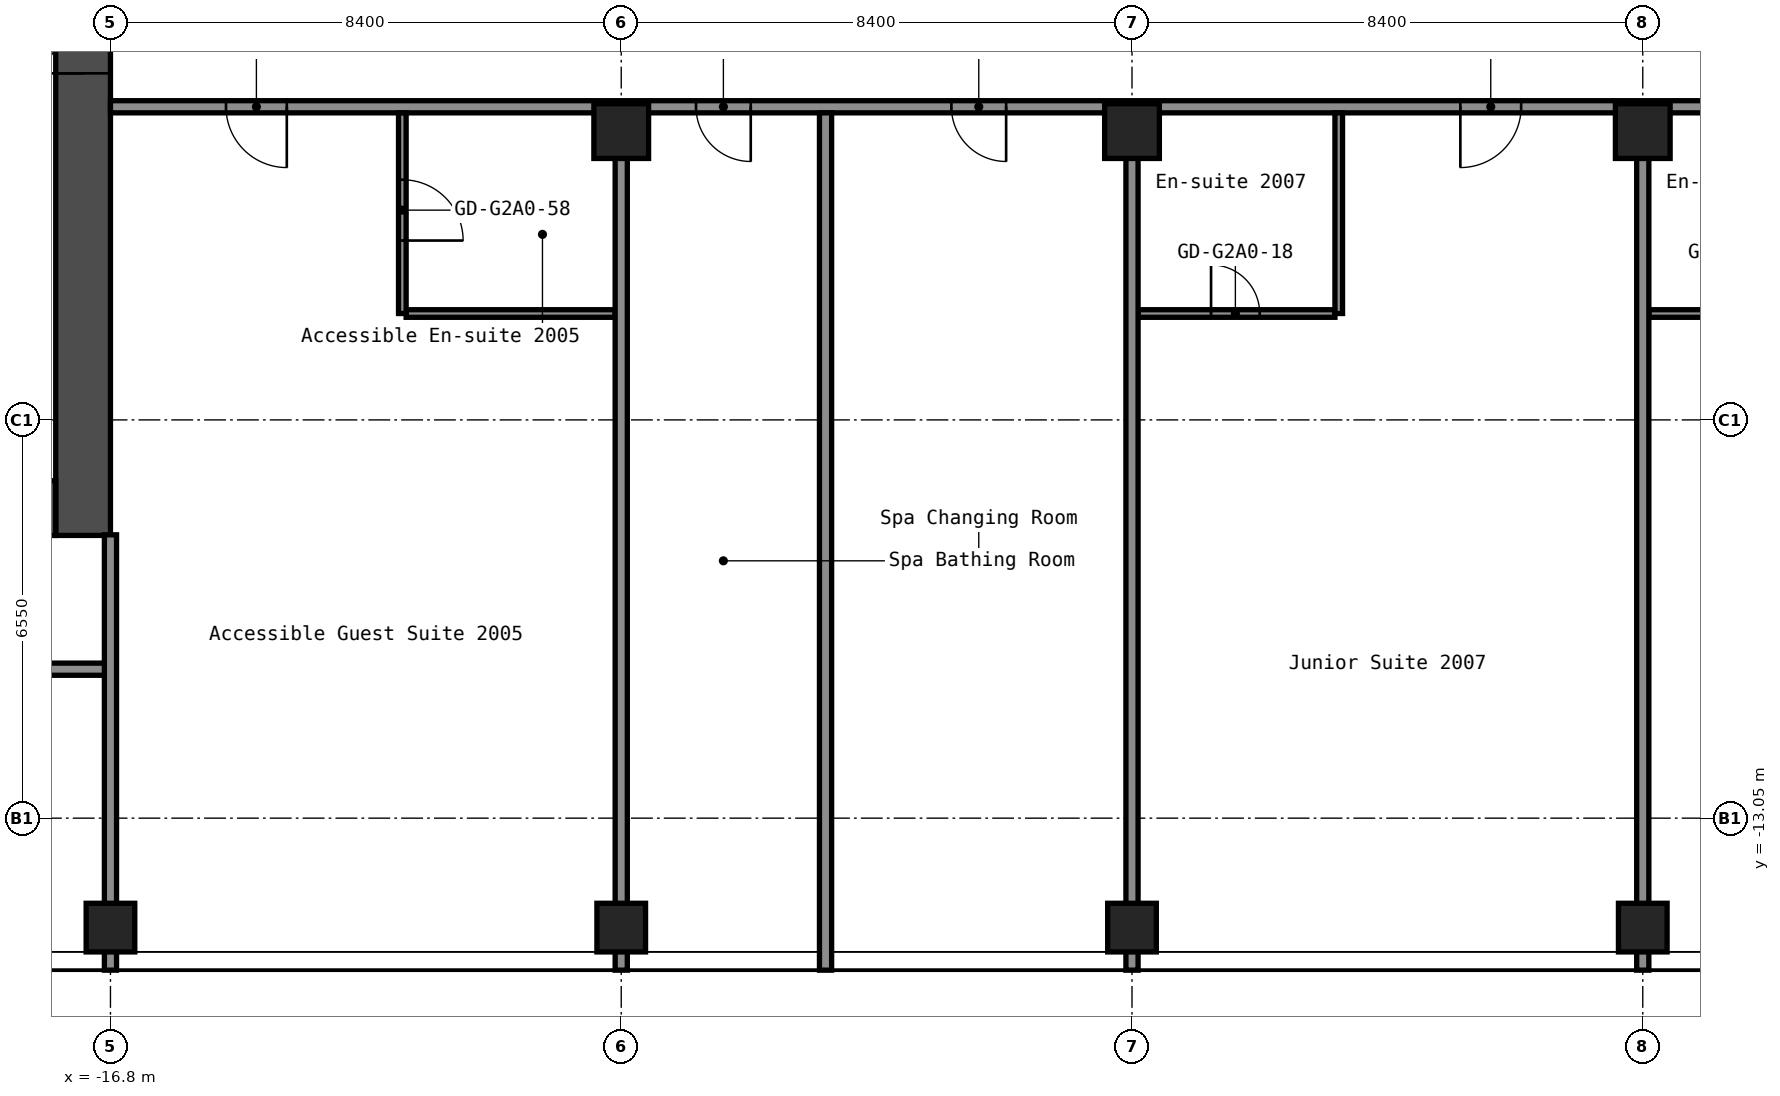
"""IFC4 building model, lengths in metres.
Left out: names, types, materials, properties, quantities, classifications, styles, units other than length and angle.
Written with IfcOpenShell. Run it as: python <this file> out.ifc"""

import sys

from ifc_helpers import new_model, si_unit, direction, frame, frame_2d, origin, origin_2d, place, context, subcontext, project, spatial, rectangle, hollow_rectangle, extrude, element, fill, save


model = new_model("IFC4")
c1 = context("Model", 3, precision=1e-05, world=origin(), true_north=direction((0.0, 1.0)))
c2 = subcontext(c1, "Body", "Model", "MODEL_VIEW")
j1 = project(units=[si_unit("LENGTHUNIT", "METRE"), si_unit("PLANEANGLEUNIT", "RADIAN")], contexts=[c1])
p1 = place(None, origin())
s1 = spatial("IfcSite", under=j1, at=p1, CompositionType="ELEMENT")
p2 = place(p1, origin())
s2 = spatial("IfcBuilding", under=s1, at=p2, CompositionType="ELEMENT")
p3 = place(p2, frame((0.0, 0.0, 75.4)))
s3 = spatial("IfcBuildingStorey", under=s2, at=p3, CompositionType="ELEMENT", Elevation=75.4)
for number, where, z_axis, x_axis in (
    (1, (-16.8, -14.85, 0.0), (0.0, 0.0, 1.0), (1.0, 0.0, 0.0)),
    (2, (-8.4, -14.85, 0.0), (0.0, 0.0, 1.0), (1.0, 0.0, 0.0)),
):
    element("IfcColumn", number, at=place(p3, frame(where, z_axis=z_axis, x_axis=x_axis)), inside=s3, PredefinedType="COLUMN", context=c2, shape_type="SweptSolid", body=[
        extrude(hollow_rectangle(XDim=0.8, YDim=0.8, WallThickness=0.032, at=origin_2d()), origin(), (0.0, 0.0, 1.0), 2.8),
    ])
p4 = place(p3, frame((-8.4, -1.75, 0.0), z_axis=(0.0, 0.0, 1.0), x_axis=(1.0, 0.0, 0.0)))
e3 = element("IfcColumn", 3, at=p4, inside=s3, PredefinedType="COLUMN", context=c2, shape_type="SweptSolid", body=[
    extrude(hollow_rectangle(XDim=0.9, YDim=0.9, WallThickness=0.036, at=origin_2d()), origin(), (0.0, 0.0, 1.0), 2.8),
])
p5 = place(p3, frame((0.0, -14.85, 0.0), z_axis=(0.0, 0.0, 1.0), x_axis=(1.0, 0.0, 0.0)))
e4 = element("IfcColumn", 4, at=p5, inside=s3, PredefinedType="COLUMN", context=c2, shape_type="SweptSolid", body=[
    extrude(hollow_rectangle(XDim=0.8, YDim=0.8, WallThickness=0.032, at=origin_2d()), origin(), (0.0, 0.0, 1.0), 2.8),
])
p6 = place(p3, frame((0.0, -1.75, 0.0), z_axis=(0.0, 0.0, 1.0), x_axis=(1.0, 0.0, 0.0)))
e5 = element("IfcColumn", 5, at=p6, inside=s3, PredefinedType="COLUMN", context=c2, shape_type="SweptSolid", body=[
    extrude(hollow_rectangle(XDim=0.9, YDim=0.9, WallThickness=0.036, at=origin_2d()), origin(), (0.0, 0.0, 1.0), 2.8),
])
p7 = place(p3, frame((8.4, -14.85, 0.0), z_axis=(0.0, 0.0, 1.0), x_axis=(1.0, 0.0, 0.0)))
e6 = element("IfcColumn", 6, at=p7, inside=s3, PredefinedType="COLUMN", context=c2, shape_type="SweptSolid", body=[
    extrude(hollow_rectangle(XDim=0.8, YDim=0.8, WallThickness=0.032, at=origin_2d()), origin(), (0.0, 0.0, 1.0), 2.8),
])
p8 = place(p3, frame((8.4, -1.75, 0.0), z_axis=(0.0, 0.0, 1.0), x_axis=(1.0, 0.0, 0.0)))
e7 = element("IfcColumn", 7, at=p8, inside=s3, PredefinedType="COLUMN", context=c2, shape_type="SweptSolid", body=[
    extrude(hollow_rectangle(XDim=0.9, YDim=0.9, WallThickness=0.036, at=origin_2d()), origin(), (0.0, 0.0, 1.0), 2.8),
])
p9 = place(p3, frame((-17.25, -8.4, 0.0), z_axis=(0.0, 0.0, 1.0), x_axis=(0.0, 1.0, 0.0)))
e8 = element("IfcWall", 8, at=p9, inside=s3, PredefinedType="SHEAR", context=c2, shape_type="SweptSolid", body=[
    extrude(rectangle(XDim=16.8, YDim=0.9, at=frame_2d((8.4, 0.0))), origin(), (0.0, 0.0, 1.0), 2.8),
])
p10 = place(p9, frame((7.6, 0.0, 0.0)))
e9 = element("IfcOpeningElement", 9, at=p10, cuts=e8, PredefinedType="OPENING", context=c2, shape_type="SweptSolid", body=[
    extrude(rectangle(XDim=1.2, YDim=2.1, at=frame_2d((0.6, 1.05))), frame((0.0, 0.46, 0.0), z_axis=(0.0, -1.0, 0.0), x_axis=(1.0, 0.0, 0.0)), (0.0, 0.0, 1.0), 0.92),
])
p11 = place(p3, frame((-32.7, -7.95, 0.0), z_axis=(0.0, 0.0, 1.0), x_axis=(1.0, 0.0, 0.0)))
e10 = element("IfcWall", 10, at=p11, inside=s3, PredefinedType="SHEAR", context=c2, shape_type="SweptSolid", body=[
    extrude(rectangle(XDim=15.0, YDim=0.9, at=frame_2d((7.5, 0.0))), origin(), (0.0, 0.0, 1.0), 2.8),
])
p12 = place(p11, frame((11.45, 0.0, 0.0)))
e11 = element("IfcOpeningElement", 11, at=p12, cuts=e10, PredefinedType="OPENING", context=c2, shape_type="SweptSolid", body=[
    extrude(rectangle(XDim=1.0, YDim=2.1, at=frame_2d((0.5, 1.05))), frame((0.0, 0.46, 0.0), z_axis=(0.0, -1.0, 0.0), x_axis=(1.0, 0.0, 0.0)), (0.0, 0.0, 1.0), 0.92),
])
p13 = place(p3, frame((-46.5, -10.6, 0.0), z_axis=(0.0, 0.0, 1.0), x_axis=(1.0, 0.0, 0.0)))
e12 = element("IfcWall", 12, at=p13, inside=s3, PredefinedType="PARTITIONING", context=c2, shape_type="SweptSolid", body=[
    extrude(rectangle(XDim=29.7, YDim=0.2, at=frame_2d((14.85, 0.0))), origin(), (0.0, 0.0, 1.0), 2.8),
])
p14 = place(p13, frame((1.95, 0.0, 0.0)))
e13 = element("IfcOpeningElement", 13, at=p14, cuts=e12, PredefinedType="OPENING", context=c2, shape_type="SweptSolid", body=[
    extrude(rectangle(XDim=0.9, YDim=2.1, at=frame_2d((0.45, 1.05))), frame((0.0, 0.11, 0.0), z_axis=(0.0, -1.0, 0.0), x_axis=(1.0, 0.0, 0.0)), (0.0, 0.0, 1.0), 0.22),
])
p15 = place(p13, frame((8.2, 0.0, 0.0)))
e14 = element("IfcOpeningElement", 14, at=p15, cuts=e12, PredefinedType="OPENING", context=c2, shape_type="SweptSolid", body=[
    extrude(rectangle(XDim=1.0, YDim=2.1, at=frame_2d((0.5, 1.05))), frame((0.0, 0.11, 0.0), z_axis=(0.0, -1.0, 0.0), x_axis=(1.0, 0.0, 0.0)), (0.0, 0.0, 1.0), 0.22),
])
p16 = place(p13, frame((14.8, 0.0, 0.0)))
e15 = element("IfcOpeningElement", 15, at=p16, cuts=e12, PredefinedType="OPENING", context=c2, shape_type="SweptSolid", body=[
    extrude(rectangle(XDim=0.9, YDim=2.1, at=frame_2d((0.45, 1.05))), frame((0.0, 0.11, 0.0), z_axis=(0.0, -1.0, 0.0), x_axis=(1.0, 0.0, 0.0)), (0.0, 0.0, 1.0), 0.22),
])
p17 = place(p13, frame((19.0, 0.0, 0.0)))
e16 = element("IfcOpeningElement", 16, at=p17, cuts=e12, PredefinedType="OPENING", context=c2, shape_type="SweptSolid", body=[
    extrude(rectangle(XDim=0.9, YDim=2.1, at=frame_2d((0.45, 1.05))), frame((0.0, 0.11, 0.0), z_axis=(0.0, -1.0, 0.0), x_axis=(1.0, 0.0, 0.0)), (0.0, 0.0, 1.0), 0.22),
])
p18 = place(p13, frame((22.555, 0.0, 0.0)))
e17 = element("IfcOpeningElement", 17, at=p18, cuts=e12, PredefinedType="OPENING", context=c2, shape_type="SweptSolid", body=[
    extrude(rectangle(XDim=0.9, YDim=2.1, at=frame_2d((0.45, 1.05))), frame((0.0, 0.11, 0.0), z_axis=(0.0, -1.0, 0.0), x_axis=(1.0, 0.0, 0.0)), (0.0, 0.0, 1.0), 0.22),
])
p19 = place(p13, frame((26.755, 0.0, 0.0)))
e18 = element("IfcOpeningElement", 18, at=p19, cuts=e12, PredefinedType="OPENING", context=c2, shape_type="SweptSolid", body=[
    extrude(rectangle(XDim=0.9, YDim=2.1, at=frame_2d((0.45, 1.05))), frame((0.0, 0.11, 0.0), z_axis=(0.0, -1.0, 0.0), x_axis=(1.0, 0.0, 0.0)), (0.0, 0.0, 1.0), 0.22),
])
p20 = place(p3, frame((-11.938, -4.75, 0.0), z_axis=(0.0, 0.0, 1.0), x_axis=(1.0, 0.0, 0.0)))
e19 = element("IfcWall", 19, at=p20, inside=s3, PredefinedType="PARTITIONING", context=c2, shape_type="SweptSolid", body=[
    extrude(rectangle(XDim=3.438, YDim=0.125, at=frame_2d((1.719, 0.0))), origin(), (0.0, 0.0, 1.0), 2.8),
])
p21 = place(p3, frame((0.1, -4.75, 0.0), z_axis=(0.0, 0.0, 1.0), x_axis=(1.0, 0.0, 0.0)))
e20 = element("IfcWall", 20, at=p21, inside=s3, PredefinedType="PARTITIONING", context=c2, shape_type="SweptSolid", body=[
    extrude(rectangle(XDim=3.237, YDim=0.125, at=frame_2d((1.619, 0.0))), origin(), (0.0, 0.0, 1.0), 2.8),
])
p22 = place(p21, frame((1.2, 0.0, 0.0)))
e21 = element("IfcOpeningElement", 21, at=p22, cuts=e20, PredefinedType="OPENING", context=c2, shape_type="SweptSolid", body=[
    extrude(rectangle(XDim=0.8, YDim=2.1, at=frame_2d((0.4, 1.05))), frame((0.0, 0.073, 0.0), z_axis=(0.0, -1.0, 0.0), x_axis=(1.0, 0.0, 0.0)), (0.0, 0.0, 1.0), 0.145),
])
p23 = place(p3, frame((8.5, -4.75, 0.0), z_axis=(0.0, 0.0, 1.0), x_axis=(1.0, 0.0, 0.0)))
e22 = element("IfcWall", 22, at=p23, inside=s3, PredefinedType="PARTITIONING", context=c2, shape_type="SweptSolid", body=[
    extrude(rectangle(XDim=3.238, YDim=0.125, at=frame_2d((1.619, 0.0))), origin(), (0.0, 0.0, 1.0), 2.8),
])
p24 = place(p23, frame((1.2, 0.0, 0.0)))
e23 = element("IfcOpeningElement", 23, at=p24, cuts=e22, PredefinedType="OPENING", context=c2, shape_type="SweptSolid", body=[
    extrude(rectangle(XDim=0.8, YDim=2.1, at=frame_2d((0.4, 1.05))), frame((0.0, 0.073, 0.0), z_axis=(0.0, -1.0, 0.0), x_axis=(1.0, 0.0, 0.0)), (0.0, 0.0, 1.0), 0.145),
])
p25 = place(p3, frame((-16.8, -1.35, 0.0), z_axis=(0.0, 0.0, 1.0), x_axis=(1.0, 0.0, 0.0)))
e24 = element("IfcWall", 24, at=p25, inside=s3, PredefinedType="PARTITIONING", context=c2, shape_type="SweptSolid", body=[
    extrude(rectangle(XDim=33.6, YDim=0.2, at=frame_2d((16.8, 0.0))), origin(), (0.0, 0.0, 1.0), 2.8),
])
p26 = place(p25, frame((1.9, 0.0, 0.0)))
e25 = element("IfcOpeningElement", 25, at=p26, cuts=e24, PredefinedType="OPENING", context=c2, shape_type="SweptSolid", body=[
    extrude(rectangle(XDim=1.0, YDim=2.1, at=frame_2d((0.5, 1.05))), frame((0.0, 0.11, 0.0), z_axis=(0.0, -1.0, 0.0), x_axis=(1.0, 0.0, 0.0)), (0.0, 0.0, 1.0), 0.22),
])
p27 = place(p25, frame((9.63, 0.0, 0.0)))
e26 = element("IfcOpeningElement", 26, at=p27, cuts=e24, PredefinedType="OPENING", context=c2, shape_type="SweptSolid", body=[
    extrude(rectangle(XDim=0.9, YDim=2.1, at=frame_2d((0.45, 1.05))), frame((0.0, 0.11, 0.0), z_axis=(0.0, -1.0, 0.0), x_axis=(1.0, 0.0, 0.0)), (0.0, 0.0, 1.0), 0.22),
])
p28 = place(p25, frame((13.83, 0.0, 0.0)))
e27 = element("IfcOpeningElement", 27, at=p28, cuts=e24, PredefinedType="OPENING", context=c2, shape_type="SweptSolid", body=[
    extrude(rectangle(XDim=0.9, YDim=2.1, at=frame_2d((0.45, 1.05))), frame((0.0, 0.11, 0.0), z_axis=(0.0, -1.0, 0.0), x_axis=(1.0, 0.0, 0.0)), (0.0, 0.0, 1.0), 0.22),
])
p29 = place(p25, frame((22.2, 0.0, 0.0)))
e28 = element("IfcOpeningElement", 28, at=p29, cuts=e24, PredefinedType="OPENING", context=c2, shape_type="SweptSolid", body=[
    extrude(rectangle(XDim=1.0, YDim=2.1, at=frame_2d((0.5, 1.05))), frame((0.0, 0.11, 0.0), z_axis=(0.0, -1.0, 0.0), x_axis=(1.0, 0.0, 0.0)), (0.0, 0.0, 1.0), 0.22),
])
p30 = place(p25, frame((30.6, 0.0, 0.0)))
e29 = element("IfcOpeningElement", 29, at=p30, cuts=e24, PredefinedType="OPENING", context=c2, shape_type="SweptSolid", body=[
    extrude(rectangle(XDim=1.0, YDim=2.1, at=frame_2d((0.5, 1.05))), frame((0.0, 0.11, 0.0), z_axis=(0.0, -1.0, 0.0), x_axis=(1.0, 0.0, 0.0)), (0.0, 0.0, 1.0), 0.22),
])
p31 = place(p3, frame((-16.8, -15.55, 0.0), z_axis=(0.0, 0.0, 1.0), x_axis=(0.0, 1.0, 0.0)))
e30 = element("IfcWall", 30, at=p31, inside=s3, PredefinedType="PARTITIONING", context=c2, shape_type="SweptSolid", body=[
    extrude(rectangle(XDim=7.16, YDim=0.2, at=frame_2d((3.58, 0.0))), origin(), (0.0, 0.0, 1.0), 2.8),
])
p32 = place(p3, frame((-12.0, -4.75, 0.0), z_axis=(0.0, 0.0, 1.0), x_axis=(0.0, 1.0, 0.0)))
e31 = element("IfcWall", 31, at=p32, inside=s3, PredefinedType="PARTITIONING", context=c2, shape_type="SweptSolid", body=[
    extrude(rectangle(XDim=3.3, YDim=0.125, at=frame_2d((1.65, 0.0))), origin(), (0.0, 0.0, 1.0), 2.8),
])
p33 = place(p32, frame((1.2, 0.0, 0.0)))
e32 = element("IfcOpeningElement", 32, at=p33, cuts=e31, PredefinedType="OPENING", context=c2, shape_type="SweptSolid", body=[
    extrude(rectangle(XDim=1.0, YDim=2.1, at=frame_2d((0.5, 1.05))), frame((0.0, 0.073, 0.0), z_axis=(0.0, -1.0, 0.0), x_axis=(1.0, 0.0, 0.0)), (0.0, 0.0, 1.0), 0.145),
])
p34 = place(p3, frame((-8.4, -15.55, 0.0), z_axis=(0.0, 0.0, 1.0), x_axis=(0.0, 1.0, 0.0)))
e33 = element("IfcWall", 33, at=p34, inside=s3, PredefinedType="PARTITIONING", context=c2, shape_type="SweptSolid", body=[
    extrude(rectangle(XDim=13.36, YDim=0.2, at=frame_2d((6.68, 0.0))), origin(), (0.0, 0.0, 1.0), 2.8),
])
p35 = place(p3, frame((-5.04, -15.55, 0.0), z_axis=(0.0, 0.0, 1.0), x_axis=(0.0, 1.0, 0.0)))
e34 = element("IfcWall", 34, at=p35, inside=s3, PredefinedType="PARTITIONING", context=c2, shape_type="SweptSolid", body=[
    extrude(rectangle(XDim=14.1, YDim=0.2, at=frame_2d((7.05, 0.0))), origin(), (0.0, 0.0, 1.0), 2.8),
])
p36 = place(p3, frame((0.0, -15.55, 0.0), z_axis=(0.0, 0.0, 1.0), x_axis=(0.0, 1.0, 0.0)))
e35 = element("IfcWall", 35, at=p36, inside=s3, PredefinedType="PARTITIONING", context=c2, shape_type="SweptSolid", body=[
    extrude(rectangle(XDim=13.36, YDim=0.2, at=frame_2d((6.68, 0.0))), origin(), (0.0, 0.0, 1.0), 2.8),
])
p37 = place(p3, frame((3.4, -4.75, 0.0), z_axis=(0.0, 0.0, 1.0), x_axis=(0.0, 1.0, 0.0)))
e36 = element("IfcWall", 36, at=p37, inside=s3, PredefinedType="PARTITIONING", context=c2, shape_type="SweptSolid", body=[
    extrude(rectangle(XDim=3.3, YDim=0.125, at=frame_2d((1.65, 0.0))), origin(), (0.0, 0.0, 1.0), 2.8),
])
p38 = place(p3, frame((8.4, -15.55, 0.0), z_axis=(0.0, 0.0, 1.0), x_axis=(0.0, 1.0, 0.0)))
e37 = element("IfcWall", 37, at=p38, inside=s3, PredefinedType="PARTITIONING", context=c2, shape_type="SweptSolid", body=[
    extrude(rectangle(XDim=13.36, YDim=0.2, at=frame_2d((6.68, 0.0))), origin(), (0.0, 0.0, 1.0), 2.8),
])
p39 = place(p10, origin())
e38 = element("IfcDoor", 38, at=p39, inside=s3, OperationType="DOUBLE_DOOR_SINGLE_SWING", PredefinedType="DOOR", context=c2, shape_type="SweptSolid", body=[
    extrude(rectangle(XDim=1.2, YDim=2.1, at=frame_2d((0.6, 1.05))), frame((0.0, 0.025, 0.0), z_axis=(0.0, -1.0, 0.0), x_axis=(1.0, 0.0, 0.0)), (0.0, 0.0, 1.0), 0.05),
])
fill(e9, e38)
p40 = place(p22, origin())
e39 = element("IfcDoor", 39, at=p40, inside=s3, OperationType="SINGLE_SWING_RIGHT", PredefinedType="DOOR", context=c2, shape_type="SweptSolid", body=[
    extrude(rectangle(XDim=0.8, YDim=2.1, at=frame_2d((0.4, 1.05))), frame((0.0, 0.025, 0.0), z_axis=(0.0, -1.0, 0.0), x_axis=(1.0, 0.0, 0.0)), (0.0, 0.0, 1.0), 0.05),
])
fill(e21, e39)
p41 = place(p26, origin())
e40 = element("IfcDoor", 40, at=p41, inside=s3, OperationType="SINGLE_SWING_RIGHT", PredefinedType="DOOR", context=c2, shape_type="SweptSolid", body=[
    extrude(rectangle(XDim=1.0, YDim=2.1, at=frame_2d((0.5, 1.05))), frame((0.0, 0.025, 0.0), z_axis=(0.0, -1.0, 0.0), x_axis=(1.0, 0.0, 0.0)), (0.0, 0.0, 1.0), 0.05),
])
fill(e25, e40)
p42 = place(p27, origin())
e41 = element("IfcDoor", 41, at=p42, inside=s3, OperationType="SINGLE_SWING_RIGHT", PredefinedType="DOOR", context=c2, shape_type="SweptSolid", body=[
    extrude(rectangle(XDim=0.9, YDim=2.1, at=frame_2d((0.45, 1.05))), frame((0.0, 0.025, 0.0), z_axis=(0.0, -1.0, 0.0), x_axis=(1.0, 0.0, 0.0)), (0.0, 0.0, 1.0), 0.05),
])
fill(e26, e41)
p43 = place(p28, origin())
e42 = element("IfcDoor", 42, at=p43, inside=s3, OperationType="SINGLE_SWING_RIGHT", PredefinedType="DOOR", context=c2, shape_type="SweptSolid", body=[
    extrude(rectangle(XDim=0.9, YDim=2.1, at=frame_2d((0.45, 1.05))), frame((0.0, 0.025, 0.0), z_axis=(0.0, -1.0, 0.0), x_axis=(1.0, 0.0, 0.0)), (0.0, 0.0, 1.0), 0.05),
])
fill(e27, e42)
p44 = place(p29, origin())
e43 = element("IfcDoor", 43, at=p44, inside=s3, OperationType="SINGLE_SWING_LEFT", PredefinedType="DOOR", context=c2, shape_type="SweptSolid", body=[
    extrude(rectangle(XDim=1.0, YDim=2.1, at=frame_2d((0.5, 1.05))), frame((0.0, 0.025, 0.0), z_axis=(0.0, -1.0, 0.0), x_axis=(1.0, 0.0, 0.0)), (0.0, 0.0, 1.0), 0.05),
])
fill(e28, e43)
p45 = place(p33, origin())
e44 = element("IfcDoor", 44, at=p45, inside=s3, OperationType="SINGLE_SWING_LEFT", PredefinedType="DOOR", context=c2, shape_type="SweptSolid", body=[
    extrude(rectangle(XDim=1.0, YDim=2.1, at=frame_2d((0.5, 1.05))), frame((0.0, 0.025, 0.0), z_axis=(0.0, -1.0, 0.0), x_axis=(1.0, 0.0, 0.0)), (0.0, 0.0, 1.0), 0.05),
])
fill(e32, e44)
save(model, sys.argv[1])
